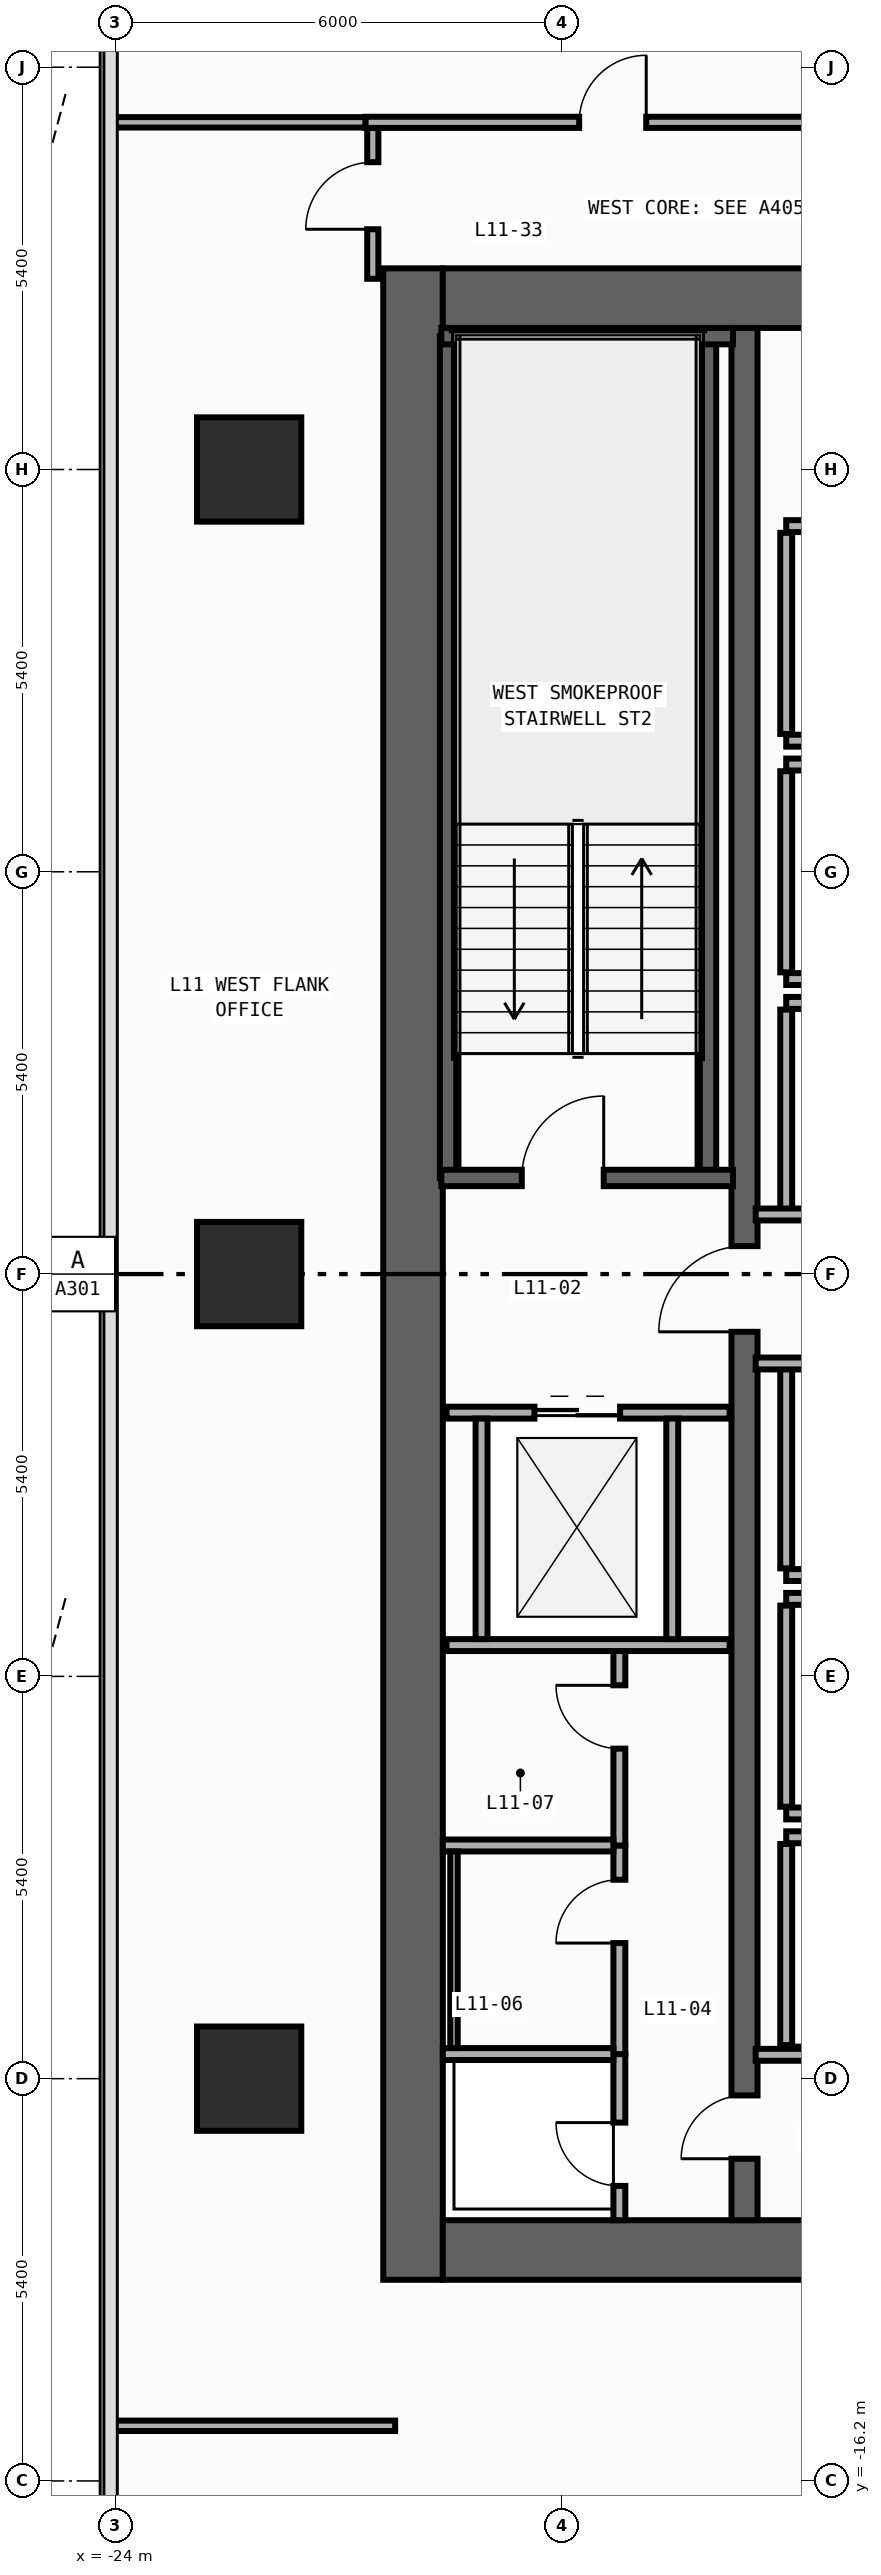
"""IFC4 building model, lengths in metres.
Left out: names, types, materials, properties, quantities, classifications, styles, units other than length and angle.
Written with IfcOpenShell. Run it as: python <this file> out.ifc"""

import sys

from ifc_helpers import new_model, si_unit, direction, frame, frame_2d, origin, origin_2d, place, context, subcontext, project, spatial, rectangle, extrude, element, fill, save


model = new_model("IFC4")
c1 = context("Model", 3, precision=1e-05, world=origin(), true_north=direction((0.0, 1.0)))
c2 = subcontext(c1, "Body", "Model", "MODEL_VIEW")
j1 = project(units=[si_unit("LENGTHUNIT", "METRE"), si_unit("PLANEANGLEUNIT", "RADIAN")], contexts=[c1])
p1 = place(None, origin())
s1 = spatial("IfcSite", under=j1, at=p1, CompositionType="ELEMENT")
p2 = place(p1, origin())
s2 = spatial("IfcBuilding", under=s1, at=p2, CompositionType="ELEMENT")
p3 = place(p2, frame((0.0, 0.0, 47.0)))
s3 = spatial("IfcBuildingStorey", under=s2, at=p3, CompositionType="ELEMENT", Elevation=47.0)
p4 = place(p3, frame((-20.0, -13.5, 0.0), z_axis=(0.0, 0.0, 1.0), x_axis=(0.0, 1.0, 0.0)))
e1 = element("IfcWall", 1, at=p4, inside=s3, PredefinedType="SHEAR", context=c2, shape_type="SweptSolid", body=[
    extrude(rectangle(XDim=27.0, YDim=0.8, at=frame_2d((13.5, 0.0))), origin(), (0.0, 0.0, 1.0), 3.94),
])
for number, where, z_axis, x_axis in (
    (2, (-19.6, -13.1, 0.0), (0.0, 0.0, 1.0), (1.0, 0.0, 0.0)),
    (3, (-19.6, 13.1, 0.0), (0.0, 0.0, 1.0), (1.0, 0.0, 0.0)),
):
    element("IfcWall", number, at=place(p3, frame(where, z_axis=z_axis, x_axis=x_axis)), inside=s3, PredefinedType="SHEAR", context=c2, shape_type="SweptSolid", body=[
        extrude(rectangle(XDim=6.8, YDim=0.8, at=frame_2d((3.4, 0.0))), origin(), (0.0, 0.0, 1.0), 3.94),
    ])
p5 = place(p3, frame((-15.55, -12.7, 0.0), z_axis=(0.0, 0.0, 1.0), x_axis=(0.0, 1.0, 0.0)))
e4 = element("IfcWall", 4, at=p5, inside=s3, PredefinedType="SHEAR", context=c2, shape_type="SweptSolid", body=[
    extrude(rectangle(XDim=25.4, YDim=0.35, at=frame_2d((12.7, 0.0))), origin(), (0.0, 0.0, 1.0), 3.94),
])
p6 = place(p5, frame((11.925, 0.0, 0.0)))
e5 = element("IfcOpeningElement", 5, at=p6, cuts=e4, PredefinedType="OPENING", context=c2, shape_type="SweptSolid", body=[
    extrude(rectangle(XDim=1.15, YDim=2.2, at=frame_2d((0.575, 1.1))), frame((0.0, 0.185, 0.0), z_axis=(0.0, -1.0, 0.0), x_axis=(1.0, 0.0, 0.0)), (0.0, 0.0, 1.0), 0.37),
])
p7 = place(p5, frame((0.825, 0.0, 0.0)))
e6 = element("IfcOpeningElement", 6, at=p7, cuts=e4, PredefinedType="OPENING", context=c2, shape_type="SweptSolid", body=[
    extrude(rectangle(XDim=0.85, YDim=2.1, at=frame_2d((0.425, 1.05))), frame((0.0, 0.185, 0.0), z_axis=(0.0, -1.0, 0.0), x_axis=(1.0, 0.0, 0.0)), (0.0, 0.0, 1.0), 0.37),
])
for number, where, z_axis, x_axis in (
    (7, (-16.04, 1.29, 0.0), (0.0, 0.0, 1.0), (0.0, 1.0, 0.0)),
    (8, (-19.53, 1.29, 0.0), (0.0, 0.0, 1.0), (0.0, 1.0, 0.0)),
):
    element("IfcWall", number, at=place(p3, frame(where, z_axis=z_axis, x_axis=x_axis)), inside=s3, PredefinedType="SHEAR", context=c2, shape_type="SweptSolid", body=[
        extrude(rectangle(XDim=11.3, YDim=0.22, at=frame_2d((5.65, 0.0))), origin(), (0.0, 0.0, 1.0), 3.94),
    ])
p8 = place(p3, frame((-19.62, 12.59, 0.0), z_axis=(0.0, 0.0, 1.0), x_axis=(1.0, 0.0, 0.0)))
e9 = element("IfcWall", 9, at=p8, inside=s3, PredefinedType="SHEAR", context=c2, shape_type="SweptSolid", body=[
    extrude(rectangle(XDim=3.915, YDim=0.22, at=frame_2d((1.958, 0.0))), origin(), (0.0, 0.0, 1.0), 3.94),
])
p9 = place(p3, frame((-19.62, 1.29, 0.0), z_axis=(0.0, 0.0, 1.0), x_axis=(1.0, 0.0, 0.0)))
e10 = element("IfcWall", 10, at=p9, inside=s3, PredefinedType="SHEAR", context=c2, shape_type="SweptSolid", body=[
    extrude(rectangle(XDim=3.915, YDim=0.22, at=frame_2d((1.958, 0.0))), origin(), (0.0, 0.0, 1.0), 3.94),
])
p10 = place(p9, frame((1.08, 0.0, 0.0)))
e11 = element("IfcOpeningElement", 11, at=p10, cuts=e10, PredefinedType="OPENING", context=c2, shape_type="SweptSolid", body=[
    extrude(rectangle(XDim=1.1, YDim=2.2, at=frame_2d((0.55, 1.1))), frame((0.0, 0.12, 0.0), z_axis=(0.0, -1.0, 0.0), x_axis=(1.0, 0.0, 0.0)), (0.0, 0.0, 1.0), 0.24),
])
for number, where, z_axis, x_axis in (
    (12, (-22.2, -10.8, 0.0), (0.0, 0.0, 1.0), (1.0, 0.0, 0.0)),
    (13, (-22.2, 0.0, 0.0), (0.0, 0.0, 1.0), (1.0, 0.0, 0.0)),
    (14, (-22.2, 10.8, 0.0), (0.0, 0.0, 1.0), (1.0, 0.0, 0.0)),
):
    element("IfcColumn", number, at=place(p3, frame(where, z_axis=z_axis, x_axis=x_axis)), inside=s3, PredefinedType="COLUMN", context=c2, shape_type="SweptSolid", body=[
        extrude(rectangle(XDim=1.4, YDim=1.4, at=origin_2d()), origin(), (0.0, 0.0, 1.0), 4.2),
    ])
for number, where, z_axis, x_axis in (
    (15, (-14.99, 7.16, 0.0), (0.0, 0.0, 1.0), (1.0, 0.0, 0.0)),
    (16, (-14.99, 10.04, 0.0), (0.0, 0.0, 1.0), (1.0, 0.0, 0.0)),
):
    element("IfcWall", number, at=place(p3, frame(where, z_axis=z_axis, x_axis=x_axis)), inside=s3, PredefinedType="STANDARD", context=c2, shape_type="SweptSolid", body=[
        extrude(rectangle(XDim=2.19, YDim=0.16, at=frame_2d((1.095, 0.0))), origin(), (0.0, 0.0, 1.0), 3.94),
    ])
p11 = place(p3, frame((-14.99, 7.25, 0.0), z_axis=(0.0, 0.0, 1.0), x_axis=(0.0, 1.0, 0.0)))
e17 = element("IfcWall", 17, at=p11, inside=s3, PredefinedType="STANDARD", context=c2, shape_type="SweptSolid", body=[
    extrude(rectangle(XDim=2.7, YDim=0.16, at=frame_2d((1.35, 0.0))), origin(), (0.0, 0.0, 1.0), 3.94),
])
for number, where, z_axis, x_axis in (
    (18, (-14.99, 3.96, 0.0), (0.0, 0.0, 1.0), (1.0, 0.0, 0.0)),
    (19, (-14.99, 6.84, 0.0), (0.0, 0.0, 1.0), (1.0, 0.0, 0.0)),
):
    element("IfcWall", number, at=place(p3, frame(where, z_axis=z_axis, x_axis=x_axis)), inside=s3, PredefinedType="STANDARD", context=c2, shape_type="SweptSolid", body=[
        extrude(rectangle(XDim=2.19, YDim=0.16, at=frame_2d((1.095, 0.0))), origin(), (0.0, 0.0, 1.0), 3.94),
    ])
p12 = place(p3, frame((-14.99, 4.05, 0.0), z_axis=(0.0, 0.0, 1.0), x_axis=(0.0, 1.0, 0.0)))
e20 = element("IfcWall", 20, at=p12, inside=s3, PredefinedType="STANDARD", context=c2, shape_type="SweptSolid", body=[
    extrude(rectangle(XDim=2.7, YDim=0.16, at=frame_2d((1.35, 0.0))), origin(), (0.0, 0.0, 1.0), 3.94),
])
p13 = place(p3, frame((-14.99, 3.64, 0.0), z_axis=(0.0, 0.0, 1.0), x_axis=(1.0, 0.0, 0.0)))
e21 = element("IfcWall", 21, at=p13, inside=s3, PredefinedType="STANDARD", context=c2, shape_type="SweptSolid", body=[
    extrude(rectangle(XDim=2.19, YDim=0.16, at=frame_2d((1.095, 0.0))), origin(), (0.0, 0.0, 1.0), 3.94),
])
p14 = place(p3, frame((-14.99, 0.85, 0.0), z_axis=(0.0, 0.0, 1.0), x_axis=(0.0, 1.0, 0.0)))
e22 = element("IfcWall", 22, at=p14, inside=s3, PredefinedType="STANDARD", context=c2, shape_type="SweptSolid", body=[
    extrude(rectangle(XDim=2.7, YDim=0.16, at=frame_2d((1.35, 0.0))), origin(), (0.0, 0.0, 1.0), 3.94),
])
p15 = place(p3, frame((-14.99, -4.04, 0.0), z_axis=(0.0, 0.0, 1.0), x_axis=(1.0, 0.0, 0.0)))
e23 = element("IfcWall", 23, at=p15, inside=s3, PredefinedType="STANDARD", context=c2, shape_type="SweptSolid", body=[
    extrude(rectangle(XDim=2.19, YDim=0.16, at=frame_2d((1.095, 0.0))), origin(), (0.0, 0.0, 1.0), 3.94),
])
p16 = place(p3, frame((-14.99, -3.95, 0.0), z_axis=(0.0, 0.0, 1.0), x_axis=(0.0, 1.0, 0.0)))
e24 = element("IfcWall", 24, at=p16, inside=s3, PredefinedType="STANDARD", context=c2, shape_type="SweptSolid", body=[
    extrude(rectangle(XDim=2.7, YDim=0.16, at=frame_2d((1.35, 0.0))), origin(), (0.0, 0.0, 1.0), 3.94),
])
for number, where, z_axis, x_axis in (
    (25, (-14.99, -7.24, 0.0), (0.0, 0.0, 1.0), (1.0, 0.0, 0.0)),
    (26, (-14.99, -4.36, 0.0), (0.0, 0.0, 1.0), (1.0, 0.0, 0.0)),
):
    element("IfcWall", number, at=place(p3, frame(where, z_axis=z_axis, x_axis=x_axis)), inside=s3, PredefinedType="STANDARD", context=c2, shape_type="SweptSolid", body=[
        extrude(rectangle(XDim=2.19, YDim=0.16, at=frame_2d((1.095, 0.0))), origin(), (0.0, 0.0, 1.0), 3.94),
    ])
p17 = place(p3, frame((-14.99, -7.15, 0.0), z_axis=(0.0, 0.0, 1.0), x_axis=(0.0, 1.0, 0.0)))
e27 = element("IfcWall", 27, at=p17, inside=s3, PredefinedType="STANDARD", context=c2, shape_type="SweptSolid", body=[
    extrude(rectangle(XDim=2.7, YDim=0.16, at=frame_2d((1.35, 0.0))), origin(), (0.0, 0.0, 1.0), 3.94),
])
p18 = place(p3, frame((-14.99, -7.56, 0.0), z_axis=(0.0, 0.0, 1.0), x_axis=(1.0, 0.0, 0.0)))
e28 = element("IfcWall", 28, at=p18, inside=s3, PredefinedType="STANDARD", context=c2, shape_type="SweptSolid", body=[
    extrude(rectangle(XDim=2.19, YDim=0.16, at=frame_2d((1.095, 0.0))), origin(), (0.0, 0.0, 1.0), 3.94),
])
p19 = place(p3, frame((-14.99, -10.35, 0.0), z_axis=(0.0, 0.0, 1.0), x_axis=(0.0, 1.0, 0.0)))
e29 = element("IfcWall", 29, at=p19, inside=s3, PredefinedType="STANDARD", context=c2, shape_type="SweptSolid", body=[
    extrude(rectangle(XDim=2.7, YDim=0.16, at=frame_2d((1.35, 0.0))), origin(), (0.0, 0.0, 1.0), 3.94),
])
p20 = place(p3, frame((-19.55, -1.86, 0.0), z_axis=(0.0, 0.0, 1.0), x_axis=(1.0, 0.0, 0.0)))
e30 = element("IfcWall", 30, at=p20, inside=s3, PredefinedType="STANDARD", context=c2, shape_type="SweptSolid", body=[
    extrude(rectangle(XDim=3.8, YDim=0.16, at=frame_2d((1.9, 0.0))), origin(), (0.0, 0.0, 1.0), 3.94),
])
p21 = place(p20, frame((1.18, 0.0, 0.0)))
e31 = element("IfcOpeningElement", 31, at=p21, cuts=e30, PredefinedType="OPENING", context=c2, shape_type="SweptSolid", body=[
    extrude(rectangle(XDim=1.15, YDim=2.2, at=frame_2d((0.575, 1.1))), frame((0.0, 0.09, 0.0), z_axis=(0.0, -1.0, 0.0), x_axis=(1.0, 0.0, 0.0)), (0.0, 0.0, 1.0), 0.18),
])
p22 = place(p3, frame((-19.55, -4.98, 0.0), z_axis=(0.0, 0.0, 1.0), x_axis=(1.0, 0.0, 0.0)))
e32 = element("IfcWall", 32, at=p22, inside=s3, PredefinedType="STANDARD", context=c2, shape_type="SweptSolid", body=[
    extrude(rectangle(XDim=3.8, YDim=0.16, at=frame_2d((1.9, 0.0))), origin(), (0.0, 0.0, 1.0), 3.94),
])
for number, where, z_axis, x_axis in (
    (33, (-19.08, -4.9, 0.0), (0.0, 0.0, 1.0), (0.0, 1.0, 0.0)),
    (34, (-16.52, -4.9, 0.0), (0.0, 0.0, 1.0), (0.0, 1.0, 0.0)),
):
    element("IfcWall", number, at=place(p3, frame(where, z_axis=z_axis, x_axis=x_axis)), inside=s3, PredefinedType="STANDARD", context=c2, shape_type="SweptSolid", body=[
        extrude(rectangle(XDim=2.96, YDim=0.16, at=frame_2d((1.48, 0.0))), origin(), (0.0, 0.0, 1.0), 3.94),
    ])
for number, where, z_axis, x_axis in (
    (35, (-15.4, 0.8, 0.0), (0.0, 0.0, 1.0), (1.0, 0.0, 0.0)),
    (36, (-15.4, -1.2, 0.0), (0.0, 0.0, 1.0), (1.0, 0.0, 0.0)),
    (37, (-15.4, -10.48, 0.0), (0.0, 0.0, 1.0), (1.0, 0.0, 0.0)),
):
    element("IfcWall", number, at=place(p3, frame(where, z_axis=z_axis, x_axis=x_axis)), inside=s3, PredefinedType="STANDARD", context=c2, shape_type="SweptSolid", body=[
        extrude(rectangle(XDim=2.6, YDim=0.16, at=frame_2d((1.3, 0.0))), origin(), (0.0, 0.0, 1.0), 3.94),
    ])
p23 = place(p3, frame((-17.23, -12.7, 0.0), z_axis=(0.0, 0.0, 1.0), x_axis=(0.0, 1.0, 0.0)))
e38 = element("IfcWall", 38, at=p23, inside=s3, PredefinedType="PARTITIONING", context=c2, shape_type="SweptSolid", body=[
    extrude(rectangle(XDim=2.23, YDim=0.16, at=frame_2d((1.115, 0.0))), origin(), (0.0, 0.0, 1.0), 3.94),
])
p24 = place(p23, frame((0.46, 0.0, 0.0)))
e39 = element("IfcOpeningElement", 39, at=p24, cuts=e38, PredefinedType="OPENING", context=c2, shape_type="SweptSolid", body=[
    extrude(rectangle(XDim=0.85, YDim=2.1, at=frame_2d((0.425, 1.05))), frame((0.0, 0.09, 0.0), z_axis=(0.0, -1.0, 0.0), x_axis=(1.0, 0.0, 0.0)), (0.0, 0.0, 1.0), 0.18),
])
p25 = place(p3, frame((-17.23, -10.47, 0.0), z_axis=(0.0, 0.0, 1.0), x_axis=(0.0, 1.0, 0.0)))
e40 = element("IfcWall", 40, at=p25, inside=s3, PredefinedType="PARTITIONING", context=c2, shape_type="SweptSolid", body=[
    extrude(rectangle(XDim=2.8, YDim=0.16, at=frame_2d((1.4, 0.0))), origin(), (0.0, 0.0, 1.0), 3.94),
])
p26 = place(p25, frame((1.49, 0.0, 0.0)))
e41 = element("IfcOpeningElement", 41, at=p26, cuts=e40, PredefinedType="OPENING", context=c2, shape_type="SweptSolid", body=[
    extrude(rectangle(XDim=0.85, YDim=2.1, at=frame_2d((0.425, 1.05))), frame((0.0, 0.09, 0.0), z_axis=(0.0, -1.0, 0.0), x_axis=(1.0, 0.0, 0.0)), (0.0, 0.0, 1.0), 0.18),
])
p27 = place(p3, frame((-17.23, -7.67, 0.0), z_axis=(0.0, 0.0, 1.0), x_axis=(0.0, 1.0, 0.0)))
e42 = element("IfcWall", 42, at=p27, inside=s3, PredefinedType="PARTITIONING", context=c2, shape_type="SweptSolid", body=[
    extrude(rectangle(XDim=2.61, YDim=0.16, at=frame_2d((1.305, 0.0))), origin(), (0.0, 0.0, 1.0), 3.94),
])
p28 = place(p27, frame((1.3, 0.0, 0.0)))
e43 = element("IfcOpeningElement", 43, at=p28, cuts=e42, PredefinedType="OPENING", context=c2, shape_type="SweptSolid", body=[
    extrude(rectangle(XDim=0.85, YDim=2.1, at=frame_2d((0.425, 1.05))), frame((0.0, 0.09, 0.0), z_axis=(0.0, -1.0, 0.0), x_axis=(1.0, 0.0, 0.0)), (0.0, 0.0, 1.0), 0.18),
])
for number, where, z_axis, x_axis in (
    (44, (-19.6, -10.47, 0.0), (0.0, 0.0, 1.0), (1.0, 0.0, 0.0)),
    (45, (-19.6, -7.67, 0.0), (0.0, 0.0, 1.0), (1.0, 0.0, 0.0)),
):
    element("IfcWall", number, at=place(p3, frame(where, z_axis=z_axis, x_axis=x_axis)), inside=s3, PredefinedType="PARTITIONING", context=c2, shape_type="SweptSolid", body=[
        extrude(rectangle(XDim=2.29, YDim=0.16, at=frame_2d((1.145, 0.0))), origin(), (0.0, 0.0, 1.0), 3.94),
    ])
p29 = place(p3, frame((-20.54, 13.36, 0.0), z_axis=(0.0, 0.0, 1.0), x_axis=(0.0, 1.0, 0.0)))
e46 = element("IfcWall", 46, at=p29, inside=s3, PredefinedType="PARTITIONING", context=c2, shape_type="SweptSolid", body=[
    extrude(rectangle(XDim=2.025, YDim=0.15, at=frame_2d((1.012, 0.0))), origin(), (0.0, 0.0, 1.0), 3.94),
])
p30 = place(p29, frame((0.665, 0.0, 0.0)))
e47 = element("IfcOpeningElement", 47, at=p30, cuts=e46, PredefinedType="OPENING", context=c2, shape_type="SweptSolid", body=[
    extrude(rectangle(XDim=0.9, YDim=2.15, at=frame_2d((0.45, 1.075))), frame((0.0, 0.085, 0.0), z_axis=(0.0, -1.0, 0.0), x_axis=(1.0, 0.0, 0.0)), (0.0, 0.0, 1.0), 0.17),
])
p31 = place(p3, frame((-20.64, 15.46, 0.0), z_axis=(0.0, 0.0, 1.0), x_axis=(1.0, 0.0, 0.0)))
e48 = element("IfcWall", 48, at=p31, inside=s3, PredefinedType="PARTITIONING", context=c2, shape_type="SweptSolid", body=[
    extrude(rectangle(XDim=8.65, YDim=0.15, at=frame_2d((4.325, 0.0))), origin(), (0.0, 0.0, 1.0), 3.94),
])
p32 = place(p31, frame((2.871, 0.0, 0.0)))
e49 = element("IfcOpeningElement", 49, at=p32, cuts=e48, PredefinedType="OPENING", context=c2, shape_type="SweptSolid", body=[
    extrude(rectangle(XDim=0.9, YDim=2.15, at=frame_2d((0.45, 1.075))), frame((0.0, 0.085, 0.0), z_axis=(0.0, -1.0, 0.0), x_axis=(1.0, 0.0, 0.0)), (0.0, 0.0, 1.0), 0.17),
])
p33 = place(p3, frame((-24.055, 15.46, 0.0), z_axis=(0.0, 0.0, 1.0), x_axis=(1.0, 0.0, 0.0)))
e50 = element("IfcWall", 50, at=p33, inside=s3, PredefinedType="PARTITIONING", context=c2, shape_type="SweptSolid", body=[
    extrude(rectangle(XDim=3.415, YDim=0.14, at=frame_2d((1.708, 0.0))), origin(), (0.0, 0.0, 1.0), 3.94),
])
p34 = place(p3, frame((-24.055, -15.46, 0.0), z_axis=(0.0, 0.0, 1.0), x_axis=(1.0, 0.0, 0.0)))
e51 = element("IfcWall", 51, at=p34, inside=s3, PredefinedType="PARTITIONING", context=c2, shape_type="SweptSolid", body=[
    extrude(rectangle(XDim=3.815, YDim=0.14, at=frame_2d((1.907, 0.0))), origin(), (0.0, 0.0, 1.0), 3.94),
])
p35 = place(p3, frame((-19.45, -10.39, 0.0), z_axis=(0.0, 0.0, 1.0), x_axis=(0.0, 1.0, 0.0)))
e52 = element("IfcWall", 52, at=p35, inside=s3, PredefinedType="PARTITIONING", context=c2, shape_type="SweptSolid", body=[
    extrude(rectangle(XDim=2.64, YDim=0.1, at=frame_2d((1.32, 0.0))), origin(), (0.0, 0.0, 1.0), 3.94),
])
p36 = place(p10, origin())
e53 = element("IfcDoor", 53, at=p36, inside=s3, OperationType="SINGLE_SWING_RIGHT", PredefinedType="DOOR", context=c2, shape_type="SweptSolid", body=[
    extrude(rectangle(XDim=1.1, YDim=2.2, at=frame_2d((0.55, 1.1))), frame((0.0, 0.025, 0.0), z_axis=(0.0, -1.0, 0.0), x_axis=(1.0, 0.0, 0.0)), (0.0, 0.0, 1.0), 0.05),
])
fill(e11, e53)
p37 = place(p6, origin())
e54 = element("IfcDoor", 54, at=p37, inside=s3, OperationType="SINGLE_SWING_LEFT", PredefinedType="DOOR", context=c2, shape_type="SweptSolid", body=[
    extrude(rectangle(XDim=1.15, YDim=2.2, at=frame_2d((0.575, 1.1))), frame((0.0, 0.025, 0.0), z_axis=(0.0, -1.0, 0.0), x_axis=(1.0, 0.0, 0.0)), (0.0, 0.0, 1.0), 0.05),
])
fill(e5, e54)
p38 = place(p7, origin())
e55 = element("IfcDoor", 55, at=p38, inside=s3, OperationType="SINGLE_SWING_LEFT", PredefinedType="DOOR", context=c2, shape_type="SweptSolid", body=[
    extrude(rectangle(XDim=0.85, YDim=2.1, at=frame_2d((0.425, 1.05))), frame((0.0, 0.025, 0.0), z_axis=(0.0, -1.0, 0.0), x_axis=(1.0, 0.0, 0.0)), (0.0, 0.0, 1.0), 0.05),
])
fill(e6, e55)
p39 = place(p21, origin())
e56 = element("IfcDoor", 56, at=p39, inside=s3, OperationType="DOUBLE_DOOR_SLIDING", PredefinedType="DOOR", context=c2, shape_type="SweptSolid", body=[
    extrude(rectangle(XDim=1.15, YDim=2.2, at=frame_2d((0.575, 1.1))), frame((0.0, 0.025, 0.0), z_axis=(0.0, -1.0, 0.0), x_axis=(1.0, 0.0, 0.0)), (0.0, 0.0, 1.0), 0.05),
])
fill(e31, e56)
p40 = place(p24, origin())
e57 = element("IfcDoor", 57, at=p40, inside=s3, OperationType="SINGLE_SWING_RIGHT", PredefinedType="DOOR", context=c2, shape_type="SweptSolid", body=[
    extrude(rectangle(XDim=0.85, YDim=2.1, at=frame_2d((0.425, 1.05))), frame((0.0, 0.025, 0.0), z_axis=(0.0, -1.0, 0.0), x_axis=(1.0, 0.0, 0.0)), (0.0, 0.0, 1.0), 0.05),
])
fill(e39, e57)
p41 = place(p26, origin())
e58 = element("IfcDoor", 58, at=p41, inside=s3, OperationType="SINGLE_SWING_LEFT", PredefinedType="DOOR", context=c2, shape_type="SweptSolid", body=[
    extrude(rectangle(XDim=0.85, YDim=2.1, at=frame_2d((0.425, 1.05))), frame((0.0, 0.025, 0.0), z_axis=(0.0, -1.0, 0.0), x_axis=(1.0, 0.0, 0.0)), (0.0, 0.0, 1.0), 0.05),
])
fill(e41, e58)
p42 = place(p28, origin())
e59 = element("IfcDoor", 59, at=p42, inside=s3, OperationType="SINGLE_SWING_RIGHT", PredefinedType="DOOR", context=c2, shape_type="SweptSolid", body=[
    extrude(rectangle(XDim=0.85, YDim=2.1, at=frame_2d((0.425, 1.05))), frame((0.0, 0.025, 0.0), z_axis=(0.0, -1.0, 0.0), x_axis=(1.0, 0.0, 0.0)), (0.0, 0.0, 1.0), 0.05),
])
fill(e43, e59)
p43 = place(p30, origin())
e60 = element("IfcDoor", 60, at=p43, inside=s3, OperationType="SINGLE_SWING_LEFT", PredefinedType="DOOR", context=c2, shape_type="SweptSolid", body=[
    extrude(rectangle(XDim=0.9, YDim=2.15, at=frame_2d((0.45, 1.075))), frame((0.0, 0.025, 0.0), z_axis=(0.0, -1.0, 0.0), x_axis=(1.0, 0.0, 0.0)), (0.0, 0.0, 1.0), 0.05),
])
fill(e47, e60)
p44 = place(p32, origin())
e61 = element("IfcDoor", 61, at=p44, inside=s3, OperationType="SINGLE_SWING_RIGHT", PredefinedType="DOOR", context=c2, shape_type="SweptSolid", body=[
    extrude(rectangle(XDim=0.9, YDim=2.15, at=frame_2d((0.45, 1.075))), frame((0.0, 0.025, 0.0), z_axis=(0.0, -1.0, 0.0), x_axis=(1.0, 0.0, 0.0)), (0.0, 0.0, 1.0), 0.05),
])
fill(e49, e61)
save(model, sys.argv[1])
